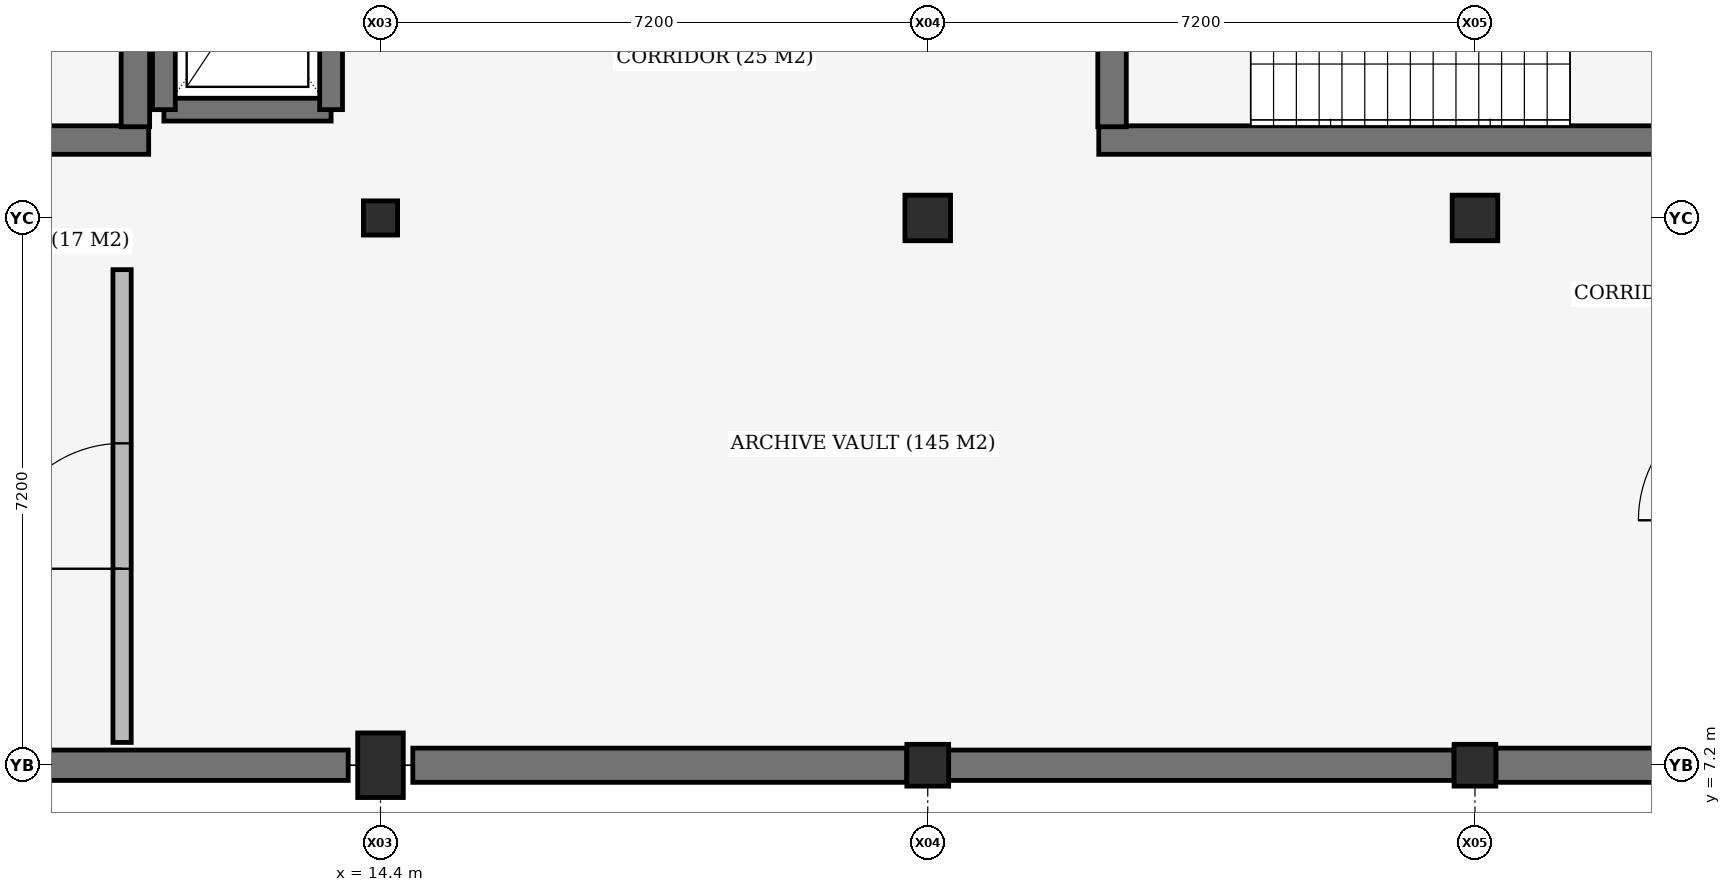
"""IFC4 building model, lengths in metres.
Left out: names, types, materials, properties, quantities, classifications, styles, units other than length and angle.
Written with IfcOpenShell. Run it as: python <this file> out.ifc"""

import sys

from ifc_helpers import new_model, si_unit, direction, frame, frame_2d, origin, origin_2d, place, context, subcontext, project, spatial, rectangle, extrude, element, fill, save


model = new_model("IFC4")
c1 = context("Model", 3, precision=1e-05, world=origin(), true_north=direction((0.0, 1.0)))
c2 = subcontext(c1, "Body", "Model", "MODEL_VIEW")
j1 = project(units=[si_unit("LENGTHUNIT", "METRE"), si_unit("PLANEANGLEUNIT", "RADIAN")], contexts=[c1])
p1 = place(None, origin())
s1 = spatial("IfcSite", under=j1, at=p1, CompositionType="ELEMENT")
p2 = place(p1, origin())
s2 = spatial("IfcBuilding", under=s1, at=p2, CompositionType="ELEMENT")
p3 = place(p2, frame((0.0, 0.0, -4.5)))
s3 = spatial("IfcBuildingStorey", under=s2, at=p3, CompositionType="ELEMENT", Elevation=-4.5)
p4 = place(p3, frame((14.4, 7.2, -0.42), z_axis=(0.0, 0.0, 1.0), x_axis=(1.0, 0.0, 0.0)))
e1 = element("IfcColumn", 1, at=p4, inside=s3, PredefinedType="COLUMN", context=c2, shape_type="SweptSolid", body=[
    extrude(rectangle(XDim=0.6, YDim=0.85, at=origin_2d()), origin(), (0.0, 0.0, 1.0), 4.6),
])
p5 = place(p3, frame((14.4, 14.4, -0.42), z_axis=(0.0, 0.0, 1.0), x_axis=(1.0, 0.0, 0.0)))
e2 = element("IfcColumn", 2, at=p5, inside=s3, PredefinedType="COLUMN", context=c2, shape_type="SweptSolid", body=[
    extrude(rectangle(XDim=0.45, YDim=0.45, at=origin_2d()), origin(), (0.0, 0.0, 1.0), 4.6),
])
p6 = place(p3, frame((21.6, 7.2, -0.42), z_axis=(0.0, 0.0, 1.0), x_axis=(1.0, 0.0, 0.0)))
e3 = element("IfcColumn", 3, at=p6, inside=s3, PredefinedType="COLUMN", context=c2, shape_type="SweptSolid", body=[
    extrude(rectangle(XDim=0.55, YDim=0.55, at=origin_2d()), origin(), (0.0, 0.0, 1.0), 4.6),
])
p7 = place(p3, frame((21.6, 14.4, -0.42), z_axis=(0.0, 0.0, 1.0), x_axis=(1.0, 0.0, 0.0)))
e4 = element("IfcColumn", 4, at=p7, inside=s3, PredefinedType="COLUMN", context=c2, shape_type="SweptSolid", body=[
    extrude(rectangle(XDim=0.6, YDim=0.6, at=origin_2d()), origin(), (0.0, 0.0, 1.0), 4.6),
])
p8 = place(p3, frame((28.8, 7.2, -0.42), z_axis=(0.0, 0.0, 1.0), x_axis=(1.0, 0.0, 0.0)))
e5 = element("IfcColumn", 5, at=p8, inside=s3, PredefinedType="COLUMN", context=c2, shape_type="SweptSolid", body=[
    extrude(rectangle(XDim=0.55, YDim=0.55, at=origin_2d()), origin(), (0.0, 0.0, 1.0), 4.6),
])
p9 = place(p3, frame((28.8, 14.4, -0.42), z_axis=(0.0, 0.0, 1.0), x_axis=(1.0, 0.0, 0.0)))
e6 = element("IfcColumn", 6, at=p9, inside=s3, PredefinedType="COLUMN", context=c2, shape_type="SweptSolid", body=[
    extrude(rectangle(XDim=0.6, YDim=0.6, at=origin_2d()), origin(), (0.0, 0.0, 1.0), 4.6),
])
p10 = place(p3, frame((2.25, 15.425, 0.0), z_axis=(0.0, 0.0, 1.0), x_axis=(1.0, 0.0, 0.0)))
e7 = element("IfcWall", 7, at=p10, inside=s3, PredefinedType="SHEAR", context=c2, shape_type="SweptSolid", body=[
    extrude(rectangle(XDim=9.1, YDim=0.375, at=frame_2d((4.55, 0.0))), origin(), (0.0, 0.0, 1.0), 4.18),
])
p11 = place(p3, frame((11.175, 15.6, 0.0), z_axis=(0.0, 0.0, 1.0), x_axis=(0.0, 1.0, 0.0)))
e8 = element("IfcWall", 8, at=p11, inside=s3, PredefinedType="SHEAR", context=c2, shape_type="SweptSolid", body=[
    extrude(rectangle(XDim=3.45, YDim=0.375, at=frame_2d((1.725, 0.0))), origin(), (0.0, 0.0, 1.0), 4.18),
])
p12 = place(p3, frame((23.85, 15.425, 0.0), z_axis=(0.0, 0.0, 1.0), x_axis=(1.0, 0.0, 0.0)))
e9 = element("IfcWall", 9, at=p12, inside=s3, PredefinedType="SHEAR", context=c2, shape_type="SweptSolid", body=[
    extrude(rectangle(XDim=9.1, YDim=0.375, at=frame_2d((4.55, 0.0))), origin(), (0.0, 0.0, 1.0), 4.18),
])
p13 = place(p3, frame((11.55, 15.825, 0.0), z_axis=(0.0, 0.0, 1.0), x_axis=(1.0, 0.0, 0.0)))
e10 = element("IfcWall", 10, at=p13, inside=s3, PredefinedType="SHEAR", context=c2, shape_type="SweptSolid", body=[
    extrude(rectangle(XDim=2.2, YDim=0.3, at=frame_2d((1.1, 0.0))), origin(), (0.0, 0.0, 1.0), 4.18),
])
for number, where, z_axis, x_axis in (
    (11, (11.55, 18.825, 0.0), (0.0, 0.0, 1.0), (0.0, -1.0, 0.0)),
    (12, (13.75, 15.825, 0.0), (0.0, 0.0, 1.0), (0.0, 1.0, 0.0)),
):
    element("IfcWall", number, at=place(p3, frame(where, z_axis=z_axis, x_axis=x_axis)), inside=s3, PredefinedType="SHEAR", context=c2, shape_type="SweptSolid", body=[
        extrude(rectangle(XDim=3.0, YDim=0.3, at=frame_2d((1.5, 0.0))), origin(), (0.0, 0.0, 1.0), 4.18),
    ])
p14 = place(p3, frame((7.575, 7.2, 0.0), z_axis=(0.0, 0.0, 1.0), x_axis=(1.0, 0.0, 0.0)))
e13 = element("IfcWall", 13, at=p14, inside=s3, PredefinedType="USERDEFINED", context=c2, shape_type="SweptSolid", body=[
    extrude(rectangle(XDim=6.4, YDim=0.4, at=frame_2d((3.2, 0.0))), origin(), (0.0, 0.0, 1.0), 4.18),
])
p15 = place(p3, frame((14.825, 7.2, 0.0), z_axis=(0.0, 0.0, 1.0), x_axis=(1.0, 0.0, 0.0)))
e14 = element("IfcWall", 14, at=p15, inside=s3, PredefinedType="USERDEFINED", context=c2, shape_type="SweptSolid", body=[
    extrude(rectangle(XDim=6.5, YDim=0.45, at=frame_2d((3.25, 0.0))), origin(), (0.0, 0.0, 1.0), 4.18),
])
p16 = place(p3, frame((21.875, 7.2, 0.0), z_axis=(0.0, 0.0, 1.0), x_axis=(1.0, 0.0, 0.0)))
e15 = element("IfcWall", 15, at=p16, inside=s3, PredefinedType="USERDEFINED", context=c2, shape_type="SweptSolid", body=[
    extrude(rectangle(XDim=6.65, YDim=0.4, at=frame_2d((3.325, 0.0))), origin(), (0.0, 0.0, 1.0), 4.18),
])
p17 = place(p3, frame((29.075, 7.2, 0.0), z_axis=(0.0, 0.0, 1.0), x_axis=(1.0, 0.0, 0.0)))
e16 = element("IfcWall", 16, at=p17, inside=s3, PredefinedType="USERDEFINED", context=c2, shape_type="SweptSolid", body=[
    extrude(rectangle(XDim=6.575, YDim=0.45, at=frame_2d((3.288, 0.0))), origin(), (0.0, 0.0, 1.0), 4.18),
])
p18 = place(p3, frame((24.025, 19.05, 0.0), z_axis=(0.0, 0.0, 1.0), x_axis=(0.0, -1.0, 0.0)))
e17 = element("IfcWall", 17, at=p18, inside=s3, PredefinedType="SHEAR", context=c2, shape_type="SweptSolid", body=[
    extrude(rectangle(XDim=3.45, YDim=0.375, at=frame_2d((1.725, 0.0))), origin(), (0.0, 0.0, 1.0), 4.18),
])
p19 = place(p18, frame((1.035, 0.0, 0.0)))
e18 = element("IfcOpeningElement", 18, at=p19, cuts=e17, PredefinedType="OPENING", context=c2, shape_type="SweptSolid", body=[
    extrude(rectangle(XDim=1.38, YDim=2.2, at=frame_2d((0.69, 1.1))), frame((0.0, 0.198, 0.0), z_axis=(0.0, -1.0, 0.0), x_axis=(1.0, 0.0, 0.0)), (0.0, 0.0, 1.0), 0.395),
])
p20 = place(p3, frame((11.0, 7.5, 0.0), z_axis=(0.0, 0.0, 1.0), x_axis=(0.0, 1.0, 0.0)))
e19 = element("IfcWall", 19, at=p20, inside=s3, PredefinedType="STANDARD", context=c2, shape_type="SweptSolid", body=[
    extrude(rectangle(XDim=6.22, YDim=0.24, at=frame_2d((3.11, 0.0))), origin(), (0.0, 0.0, 1.0), 4.18),
])
p21 = place(p20, frame((2.285, 0.0, 0.0)))
e20 = element("IfcOpeningElement", 20, at=p21, cuts=e19, PredefinedType="OPENING", context=c2, shape_type="SweptSolid", body=[
    extrude(rectangle(XDim=1.65, YDim=2.25, at=frame_2d((0.825, 1.125))), frame((0.0, 0.13, 0.0), z_axis=(0.0, -1.0, 0.0), x_axis=(1.0, 0.0, 0.0)), (0.0, 0.0, 1.0), 0.26),
])
p22 = place(p21, origin())
e21 = element("IfcDoor", 21, at=p22, inside=s3, OperationType="DOUBLE_DOOR_SINGLE_SWING", PredefinedType="DOOR", context=c2, shape_type="SweptSolid", body=[
    extrude(rectangle(XDim=1.65, YDim=2.25, at=frame_2d((0.825, 1.125))), frame((0.0, 0.025, 0.0), z_axis=(0.0, -1.0, 0.0), x_axis=(1.0, 0.0, 0.0)), (0.0, 0.0, 1.0), 0.05),
])
fill(e20, e21)
save(model, sys.argv[1])
